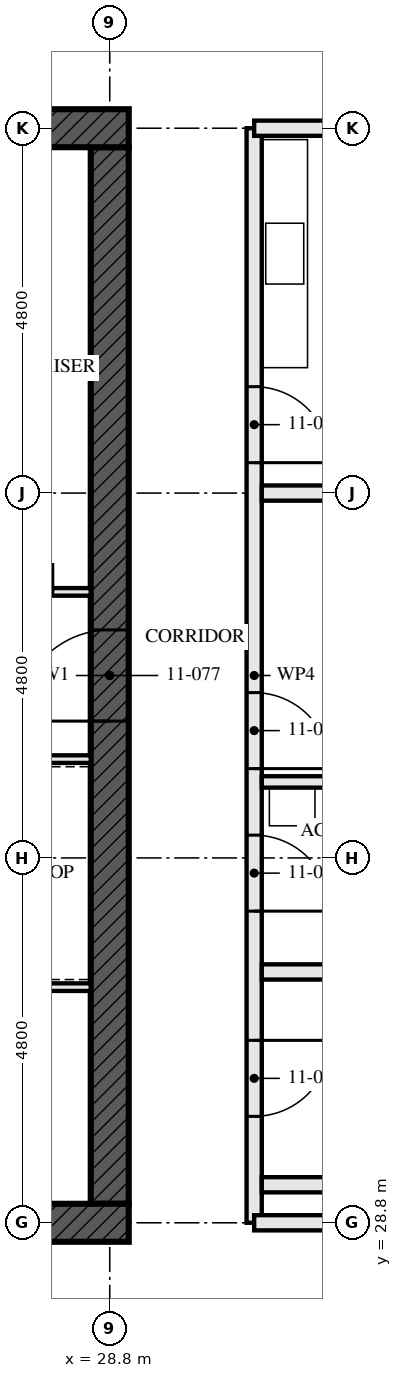
"""IFC4 building model, lengths in metres.
Left out: names, types, materials, properties, quantities, classifications, styles, units other than length and angle.
Written with IfcOpenShell. Run it as: python <this file> out.ifc"""

import sys

from ifc_helpers import new_model, si_unit, direction, frame, frame_2d, origin, place, context, subcontext, project, spatial, rectangle, extrude, element, fill, save


model = new_model("IFC4")
c1 = context("Model", 3, precision=1e-05, world=origin(), true_north=direction((0.0, 1.0)))
c2 = subcontext(c1, "Body", "Model", "MODEL_VIEW")
j1 = project(units=[si_unit("LENGTHUNIT", "METRE"), si_unit("PLANEANGLEUNIT", "RADIAN")], contexts=[c1])
p1 = place(None, origin())
s1 = spatial("IfcSite", under=j1, at=p1, CompositionType="ELEMENT")
p2 = place(p1, origin())
s2 = spatial("IfcBuilding", under=s1, at=p2, CompositionType="ELEMENT")
p3 = place(p2, frame((0.0, 0.0, 44.5)))
s3 = spatial("IfcBuildingStorey", under=s2, at=p3, CompositionType="ELEMENT", Elevation=44.5)
p4 = place(p3, frame((14.15, 28.8, -0.17), z_axis=(0.0, 0.0, 1.0), x_axis=(1.0, 0.0, 0.0)))
e1 = element("IfcWall", 1, at=p4, inside=s3, PredefinedType="SHEAR", context=c2, shape_type="SweptSolid", body=[
    extrude(rectangle(XDim=14.9, YDim=0.5, at=frame_2d((7.45, 0.0))), origin(), (0.0, 0.0, 1.0), 3.5),
])
p5 = place(p4, frame((6.85, 0.0, 0.17)))
e2 = element("IfcOpeningElement", 2, at=p5, cuts=e1, PredefinedType="OPENING", context=c2, shape_type="SweptSolid", body=[
    extrude(rectangle(XDim=1.2, YDim=2.1, at=frame_2d((0.6, 1.05))), frame((0.0, 0.26, 0.0), z_axis=(0.0, -1.0, 0.0), x_axis=(1.0, 0.0, 0.0)), (0.0, 0.0, 1.0), 0.521),
])
p6 = place(p3, frame((29.05, 43.2, -0.17), z_axis=(0.0, 0.0, 1.0), x_axis=(-1.0, 0.0, 0.0)))
e3 = element("IfcWall", 3, at=p6, inside=s3, PredefinedType="SHEAR", context=c2, shape_type="SweptSolid", body=[
    extrude(rectangle(XDim=14.9, YDim=0.5, at=frame_2d((7.45, 0.0))), origin(), (0.0, 0.0, 1.0), 3.5),
])
p7 = place(p6, frame((6.85, 0.0, 0.17)))
e4 = element("IfcOpeningElement", 4, at=p7, cuts=e3, PredefinedType="OPENING", context=c2, shape_type="SweptSolid", body=[
    extrude(rectangle(XDim=1.2, YDim=2.1, at=frame_2d((0.6, 1.05))), frame((0.0, 0.26, 0.0), z_axis=(0.0, -1.0, 0.0), x_axis=(1.0, 0.0, 0.0)), (0.0, 0.0, 1.0), 0.521),
])
p8 = place(p3, frame((28.8, 29.05, -0.17), z_axis=(0.0, 0.0, 1.0), x_axis=(0.0, 1.0, 0.0)))
e5 = element("IfcWall", 5, at=p8, inside=s3, PredefinedType="SHEAR", context=c2, shape_type="SweptSolid", body=[
    extrude(rectangle(XDim=13.9, YDim=0.5, at=frame_2d((6.95, 0.0))), origin(), (0.0, 0.0, 1.0), 3.5),
])
p9 = place(p8, frame((6.35, 0.0, 0.17)))
e6 = element("IfcOpeningElement", 6, at=p9, cuts=e5, PredefinedType="OPENING", context=c2, shape_type="SweptSolid", body=[
    extrude(rectangle(XDim=1.2, YDim=2.1, at=frame_2d((0.6, 1.05))), frame((0.0, 0.26, 0.0), z_axis=(0.0, -1.0, 0.0), x_axis=(1.0, 0.0, 0.0)), (0.0, 0.0, 1.0), 0.521),
])
for number, where, z_axis, x_axis in (
    (7, (35.5, 29.3, 0.0), (0.0, 0.0, 1.0), (-1.0, 0.0, 0.0)),
    (8, (35.5, 32.1, 0.0), (0.0, 0.0, 1.0), (-1.0, 0.0, 0.0)),
):
    element("IfcWall", number, at=place(p3, frame(where, z_axis=z_axis, x_axis=x_axis)), inside=s3, PredefinedType="SOLIDWALL", context=c2, shape_type="SweptSolid", body=[
        extrude(rectangle(XDim=4.7, YDim=0.2, at=frame_2d((2.35, 0.0))), origin(), (0.0, 0.0, 1.0), 2.99),
    ])
p10 = place(p3, frame((33.8, 34.6, 0.0), z_axis=(0.0, 0.0, 1.0), x_axis=(-1.0, 0.0, 0.0)))
e9 = element("IfcWall", 9, at=p10, inside=s3, PredefinedType="PARTITIONING", context=c2, shape_type="SweptSolid", body=[
    extrude(rectangle(XDim=3.0, YDim=0.15, at=frame_2d((1.5, 0.0))), origin(), (0.0, 0.0, 1.0), 3.33),
])
p11 = place(p3, frame((42.805, 38.4, 0.0), z_axis=(0.0, 0.0, 1.0), x_axis=(-1.0, 0.0, 0.0)))
e10 = element("IfcWall", 10, at=p11, inside=s3, PredefinedType="PARTITIONING", context=c2, shape_type="SweptSolid", body=[
    extrude(rectangle(XDim=12.005, YDim=0.2, at=frame_2d((6.002, 0.0))), origin(), (0.0, 0.0, 1.0), 2.55),
])
p12 = place(p3, frame((30.7, 28.8, 0.0), z_axis=(0.0, 0.0, 1.0), x_axis=(0.0, 1.0, 0.0)))
e11 = element("IfcWall", 11, at=p12, inside=s3, PredefinedType="PARTITIONING", context=c2, shape_type="SweptSolid", body=[
    extrude(rectangle(XDim=14.4, YDim=0.2, at=frame_2d((7.2, 0.0))), origin(), (0.0, 0.0, 1.0), 2.55),
])
p13 = place(p12, frame((1.4, 0.0, 0.0)))
e12 = element("IfcOpeningElement", 12, at=p13, cuts=e11, PredefinedType="OPENING", context=c2, shape_type="SweptSolid", body=[
    extrude(rectangle(XDim=1.0, YDim=2.1, at=frame_2d((0.5, 1.05))), frame((0.0, 0.111, 0.0), z_axis=(0.0, -1.0, 0.0), x_axis=(1.0, 0.0, 0.0)), (0.0, 0.0, 1.0), 0.221),
])
p14 = place(p12, frame((4.1, 0.0, 0.0)))
e13 = element("IfcOpeningElement", 13, at=p14, cuts=e11, PredefinedType="OPENING", context=c2, shape_type="SweptSolid", body=[
    extrude(rectangle(XDim=1.0, YDim=2.1, at=frame_2d((0.5, 1.05))), frame((0.0, 0.111, 0.0), z_axis=(0.0, -1.0, 0.0), x_axis=(1.0, 0.0, 0.0)), (0.0, 0.0, 1.0), 0.221),
])
p15 = place(p12, frame((5.975, 0.0, 0.0)))
e14 = element("IfcOpeningElement", 14, at=p15, cuts=e11, PredefinedType="OPENING", context=c2, shape_type="SweptSolid", body=[
    extrude(rectangle(XDim=1.0, YDim=2.1, at=frame_2d((0.5, 1.05))), frame((0.0, 0.111, 0.0), z_axis=(0.0, -1.0, 0.0), x_axis=(1.0, 0.0, 0.0)), (0.0, 0.0, 1.0), 0.221),
])
p16 = place(p12, frame((10.0, 0.0, 0.0)))
e15 = element("IfcOpeningElement", 15, at=p16, cuts=e11, PredefinedType="OPENING", context=c2, shape_type="SweptSolid", body=[
    extrude(rectangle(XDim=1.0, YDim=2.1, at=frame_2d((0.5, 1.05))), frame((0.0, 0.111, 0.0), z_axis=(0.0, -1.0, 0.0), x_axis=(1.0, 0.0, 0.0)), (0.0, 0.0, 1.0), 0.221),
])
p17 = place(p3, frame((23.05, 34.9, 0.0), z_axis=(0.0, 0.0, 1.0), x_axis=(1.0, 0.0, 0.0)))
e16 = element("IfcWall", 16, at=p17, inside=s3, PredefinedType="SOLIDWALL", context=c2, shape_type="SweptSolid", body=[
    extrude(rectangle(XDim=5.5, YDim=0.1, at=frame_2d((2.75, 0.0))), origin(), (0.0, 0.0, 1.0), 3.33),
])
p18 = place(p3, frame((22.65, 37.1, 0.0), z_axis=(0.0, 0.0, 1.0), x_axis=(1.0, 0.0, 0.0)))
e17 = element("IfcWall", 17, at=p18, inside=s3, PredefinedType="SOLIDWALL", context=c2, shape_type="SweptSolid", body=[
    extrude(rectangle(XDim=5.9, YDim=0.1, at=frame_2d((2.95, 0.0))), origin(), (0.0, 0.0, 1.0), 3.33),
])
p19 = place(p18, frame((3.15, 0.0, 0.0)))
e18 = element("IfcOpeningElement", 18, at=p19, cuts=e17, PredefinedType="OPENING", context=c2, shape_type="SweptSolid", body=[
    extrude(rectangle(XDim=0.9, YDim=2.1, at=frame_2d((0.45, 1.05))), frame((0.0, 0.061, 0.0), z_axis=(0.0, -1.0, 0.0), x_axis=(1.0, 0.0, 0.0)), (0.0, 0.0, 1.0), 0.121),
])
p20 = place(p18, frame((4.7, 0.0, 0.0)))
e19 = element("IfcOpeningElement", 19, at=p20, cuts=e17, PredefinedType="OPENING", context=c2, shape_type="SweptSolid", body=[
    extrude(rectangle(XDim=0.7, YDim=2.1, at=frame_2d((0.35, 1.05))), frame((0.0, 0.061, 0.0), z_axis=(0.0, -1.0, 0.0), x_axis=(1.0, 0.0, 0.0)), (0.0, 0.0, 1.0), 0.121),
])
p21 = place(p3, frame((23.15, 31.9, 0.0), z_axis=(0.0, 0.0, 1.0), x_axis=(1.0, 0.0, 0.0)))
e20 = element("IfcWall", 20, at=p21, inside=s3, PredefinedType="SOLIDWALL", context=c2, shape_type="SweptSolid", body=[
    extrude(rectangle(XDim=5.4, YDim=0.1, at=frame_2d((2.7, 0.0))), origin(), (0.0, 0.0, 1.0), 3.33),
])
for number, where, z_axis, x_axis in (
    (21, (33.205, 28.8, 0.0), (0.0, 0.0, 1.0), (-1.0, 0.0, 0.0)),
    (22, (33.205, 43.2, 0.0), (0.0, 0.0, 1.0), (-1.0, 0.0, 0.0)),
):
    element("IfcWall", number, at=place(p3, frame(where, z_axis=z_axis, x_axis=x_axis)), inside=s3, PredefinedType="PARTITIONING", context=c2, shape_type="SweptSolid", body=[
        extrude(rectangle(XDim=2.505, YDim=0.2, at=frame_2d((1.252, 0.0))), origin(), (0.0, 0.0, 1.0), 2.32),
    ])
p22 = place(p13, frame((1.0, 0.0, 0.0), z_axis=(0.0, 0.0, 1.0), x_axis=(-1.0, 0.0, 0.0)))
e23 = element("IfcDoor", 23, at=p22, inside=s3, OperationType="SINGLE_SWING_RIGHT", PredefinedType="DOOR", context=c2, shape_type="SweptSolid", body=[
    extrude(rectangle(XDim=1.0, YDim=2.1, at=frame_2d((0.5, 1.05))), frame((0.0, 0.032, 0.0), z_axis=(0.0, -1.0, 0.0), x_axis=(1.0, 0.0, 0.0)), (0.0, 0.0, 1.0), 0.064),
])
fill(e12, e23)
p23 = place(p14, frame((1.0, 0.0, 0.0), z_axis=(0.0, 0.0, 1.0), x_axis=(-1.0, 0.0, 0.0)))
e24 = element("IfcDoor", 24, at=p23, inside=s3, OperationType="SINGLE_SWING_LEFT", PredefinedType="DOOR", context=c2, shape_type="SweptSolid", body=[
    extrude(rectangle(XDim=1.0, YDim=2.1, at=frame_2d((0.5, 1.05))), frame((0.0, 0.027, 0.0), z_axis=(0.0, -1.0, 0.0), x_axis=(1.0, 0.0, 0.0)), (0.0, 0.0, 1.0), 0.054),
])
fill(e13, e24)
p24 = place(p15, frame((1.0, 0.0, 0.0), z_axis=(0.0, 0.0, 1.0), x_axis=(-1.0, 0.0, 0.0)))
e25 = element("IfcDoor", 25, at=p24, inside=s3, OperationType="SINGLE_SWING_LEFT", PredefinedType="DOOR", context=c2, shape_type="SweptSolid", body=[
    extrude(rectangle(XDim=1.0, YDim=2.1, at=frame_2d((0.5, 1.05))), frame((0.0, 0.027, 0.0), z_axis=(0.0, -1.0, 0.0), x_axis=(1.0, 0.0, 0.0)), (0.0, 0.0, 1.0), 0.054),
])
fill(e14, e25)
p25 = place(p16, frame((1.0, 0.0, 0.0), z_axis=(0.0, 0.0, 1.0), x_axis=(-1.0, 0.0, 0.0)))
e26 = element("IfcDoor", 26, at=p25, inside=s3, OperationType="SINGLE_SWING_LEFT", PredefinedType="DOOR", context=c2, shape_type="SweptSolid", body=[
    extrude(rectangle(XDim=1.0, YDim=2.1, at=frame_2d((0.5, 1.05))), frame((0.0, 0.027, 0.0), z_axis=(0.0, -1.0, 0.0), x_axis=(1.0, 0.0, 0.0)), (0.0, 0.0, 1.0), 0.054),
])
fill(e15, e26)
p26 = place(p9, origin())
e27 = element("IfcDoor", 27, at=p26, inside=s3, OperationType="SINGLE_SWING_LEFT", PredefinedType="DOOR", context=c2, shape_type="SweptSolid", body=[
    extrude(rectangle(XDim=1.2, YDim=2.1, at=frame_2d((0.6, 1.05))), frame((0.0, 0.027, 0.0), z_axis=(0.0, -1.0, 0.0), x_axis=(1.0, 0.0, 0.0)), (0.0, 0.0, 1.0), 0.054),
])
fill(e6, e27)
save(model, sys.argv[1])
